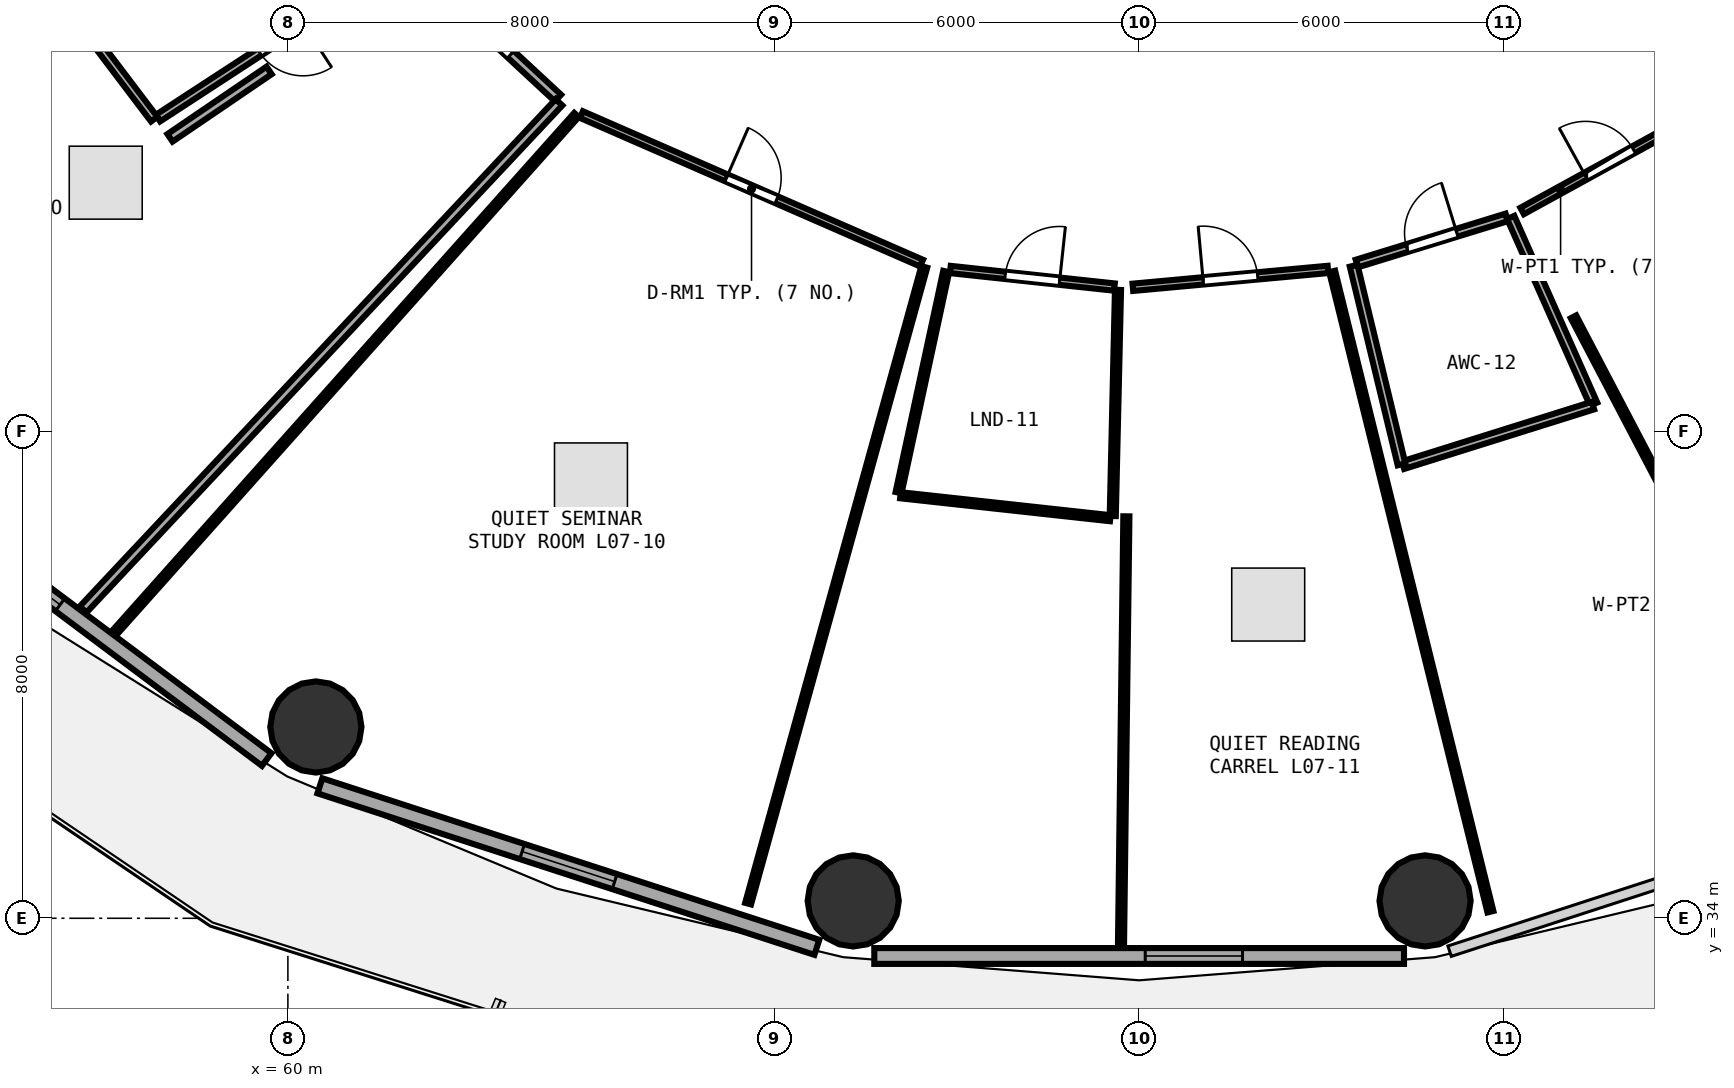
"""IFC4 building model, lengths in metres.
Left out: names, types, materials, properties, quantities, classifications, styles, units other than length and angle.
Written with IfcOpenShell. Run it as: python <this file> out.ifc"""

import sys

from ifc_helpers import new_model, si_unit, direction, frame, frame_2d, origin, origin_2d, place, context, subcontext, project, spatial, rectangle, circle, extrude, element, fill, save


model = new_model("IFC4")
c1 = context("Model", 3, precision=1e-05, world=origin(), true_north=direction((0.0, 1.0)))
c2 = subcontext(c1, "Body", "Model", "MODEL_VIEW")
j1 = project(units=[si_unit("LENGTHUNIT", "METRE"), si_unit("PLANEANGLEUNIT", "RADIAN")], contexts=[c1])
p1 = place(None, origin())
s1 = spatial("IfcSite", under=j1, at=p1, CompositionType="ELEMENT")
p2 = place(p1, origin())
s2 = spatial("IfcBuilding", under=s1, at=p2, CompositionType="ELEMENT")
p3 = place(p2, frame((0.0, 0.0, 30.0)))
s3 = spatial("IfcBuildingStorey", under=s2, at=p3, CompositionType="ELEMENT", Elevation=30.0)
for number, where, z_axis, x_axis in (
    (1, (60.46, 37.146, 0.0), (0.0, 0.0, 1.0), (1.0, 0.0, 0.0)),
    (2, (69.298, 34.286, 0.0), (0.0, 0.0, 1.0), (1.0, 0.0, 0.0)),
    (3, (78.702, 34.286, 0.0), (0.0, 0.0, 1.0), (1.0, 0.0, 0.0)),
):
    element("IfcColumn", number, at=place(p3, frame(where, z_axis=z_axis, x_axis=x_axis)), inside=s3, PredefinedType="COLUMN", context=c2, shape_type="SweptSolid", body=[
        extrude(circle(Radius=0.75, at=origin_2d()), origin(), (0.0, 0.0, 1.0), 3.75),
    ])
p4 = place(p3, frame((53.016, 41.582, 0.0), z_axis=(0.0, 0.0, 1.0), x_axis=(0.80030733173, -0.599590005569, 0.0)))
e4 = element("IfcWall", 4, at=p4, inside=s3, PredefinedType="SOLIDWALL", context=c2, shape_type="SweptSolid", body=[
    extrude(rectangle(XDim=8.291, YDim=0.26, at=frame_2d((4.145, 0.0))), origin(), (0.0, 0.0, 1.0), 3.475),
])
p5 = place(p4, frame((2.445, 0.0, 0.85)))
e5 = element("IfcOpeningElement", 5, at=p5, cuts=e4, PredefinedType="OPENING", context=c2, shape_type="SweptSolid", body=[
    extrude(rectangle(XDim=1.6, YDim=1.45, at=frame_2d((0.8, 0.725))), frame((0.0, 0.14, 0.0), z_axis=(0.0, -1.0, 0.0), x_axis=(1.0, 0.0, 0.0)), (0.0, 0.0, 1.0), 0.28),
])
p6 = place(p3, frame((60.526, 36.178, 0.0), z_axis=(0.0, 0.0, 1.0), x_axis=(0.951039914291, -0.309068085421, 0.0)))
e6 = element("IfcWall", 6, at=p6, inside=s3, PredefinedType="SOLIDWALL", context=c2, shape_type="SweptSolid", body=[
    extrude(rectangle(XDim=8.594, YDim=0.26, at=frame_2d((4.297, 0.0))), origin(), (0.0, 0.0, 1.0), 3.475),
])
p7 = place(p6, frame((3.497, 0.0, 0.85)))
e7 = element("IfcOpeningElement", 7, at=p7, cuts=e6, PredefinedType="OPENING", context=c2, shape_type="SweptSolid", body=[
    extrude(rectangle(XDim=1.6, YDim=1.45, at=frame_2d((0.8, 0.725))), frame((0.0, 0.14, 0.0), z_axis=(0.0, -1.0, 0.0), x_axis=(1.0, 0.0, 0.0)), (0.0, 0.0, 1.0), 0.28),
])
p8 = place(p3, frame((69.644, 33.38, 0.0), z_axis=(0.0, 0.0, 1.0), x_axis=(1.0, 0.0, 0.0)))
e8 = element("IfcWall", 8, at=p8, inside=s3, PredefinedType="SOLIDWALL", context=c2, shape_type="SweptSolid", body=[
    extrude(rectangle(XDim=8.712, YDim=0.26, at=frame_2d((4.356, 0.0))), origin(), (0.0, 0.0, 1.0), 3.475),
])
p9 = place(p8, frame((4.456, 0.0, 0.85)))
e9 = element("IfcOpeningElement", 9, at=p9, cuts=e8, PredefinedType="OPENING", context=c2, shape_type="SweptSolid", body=[
    extrude(rectangle(XDim=1.6, YDim=1.45, at=frame_2d((0.8, 0.725))), frame((0.0, 0.14, 0.0), z_axis=(0.0, -1.0, 0.0), x_axis=(1.0, 0.0, 0.0)), (0.0, 0.0, 1.0), 0.28),
])
p10 = place(p3, frame((61.917, 49.8, 0.0), z_axis=(0.0, 0.0, 1.0), x_axis=(-0.837796261941, -0.545982988267, 0.0)))
e10 = element("IfcWall", 10, at=p10, inside=s3, PredefinedType="PLUMBINGWALL", context=c2, shape_type="SweptSolid", body=[
    extrude(rectangle(XDim=4.838, YDim=0.13, at=frame_2d((2.419, 0.0))), origin(), (0.0, 0.0, 1.0), 3.235),
])
p11 = place(p10, frame((1.989, 0.0, 0.0)))
e11 = element("IfcOpeningElement", 11, at=p11, cuts=e10, PredefinedType="OPENING", context=c2, shape_type="SweptSolid", body=[
    extrude(rectangle(XDim=0.86, YDim=2.05, at=frame_2d((0.43, 1.025))), frame((0.0, 0.075, 0.0), z_axis=(0.0, -1.0, 0.0), x_axis=(1.0, 0.0, 0.0)), (0.0, 0.0, 1.0), 0.15),
])
p12 = place(p3, frame((62.194, 49.575, 0.0), z_axis=(0.0, 0.0, 1.0), x_axis=(0.7329267348, -0.680307578538, 0.0)))
e12 = element("IfcWall", 12, at=p12, inside=s3, PredefinedType="PARTITIONING", context=c2, shape_type="SweptSolid", body=[
    extrude(rectangle(XDim=3.067, YDim=0.15, at=frame_2d((1.533, 0.0))), origin(), (0.0, 0.0, 1.0), 2.875),
])
p13 = place(p12, frame((1.059, 0.0, 0.0)))
e13 = element("IfcOpeningElement", 13, at=p13, cuts=e12, PredefinedType="OPENING", context=c2, shape_type="SweptSolid", body=[
    extrude(rectangle(XDim=0.95, YDim=2.08, at=frame_2d((0.475, 1.04))), frame((0.0, 0.085, 0.0), z_axis=(0.0, -1.0, 0.0), x_axis=(1.0, 0.0, 0.0)), (0.0, 0.0, 1.0), 0.17),
])
p14 = place(p3, frame((64.828, 47.217, 0.0), z_axis=(0.0, 0.0, 1.0), x_axis=(0.916419655578, -0.400218708797, 0.0)))
e14 = element("IfcWall", 14, at=p14, inside=s3, PredefinedType="PARTITIONING", context=c2, shape_type="SweptSolid", body=[
    extrude(rectangle(XDim=6.104, YDim=0.12, at=frame_2d((3.052, 0.0))), origin(), (0.0, 0.0, 1.0), 2.875),
])
p15 = place(p14, frame((2.602, 0.0, 0.0)))
e15 = element("IfcOpeningElement", 15, at=p15, cuts=e14, PredefinedType="OPENING", context=c2, shape_type="SweptSolid", body=[
    extrude(rectangle(XDim=0.9, YDim=2.08, at=frame_2d((0.45, 1.04))), frame((0.0, 0.07, 0.0), z_axis=(0.0, -1.0, 0.0), x_axis=(1.0, 0.0, 0.0)), (0.0, 0.0, 1.0), 0.14),
])
p16 = place(p3, frame((70.895, 44.67, 0.0), z_axis=(0.0, 0.0, 1.0), x_axis=(0.994302004983, -0.106599825921, 0.0)))
e16 = element("IfcWall", 16, at=p16, inside=s3, PredefinedType="PARTITIONING", context=c2, shape_type="SweptSolid", body=[
    extrude(rectangle(XDim=2.714, YDim=0.12, at=frame_2d((1.357, 0.0))), origin(), (0.0, 0.0, 1.0), 3.235),
])
p17 = place(p16, frame((0.907, 0.0, 0.0)))
e17 = element("IfcOpeningElement", 17, at=p17, cuts=e16, PredefinedType="OPENING", context=c2, shape_type="SweptSolid", body=[
    extrude(rectangle(XDim=0.9, YDim=2.08, at=frame_2d((0.45, 1.04))), frame((0.0, 0.07, 0.0), z_axis=(0.0, -1.0, 0.0), x_axis=(1.0, 0.0, 0.0)), (0.0, 0.0, 1.0), 0.14),
])
p18 = place(p3, frame((73.897, 44.376, 0.0), z_axis=(0.0, 0.0, 1.0), x_axis=(0.995829610124, 0.091232601628, 0.0)))
e18 = element("IfcWall", 18, at=p18, inside=s3, PredefinedType="PARTITIONING", context=c2, shape_type="SweptSolid", body=[
    extrude(rectangle(XDim=3.222, YDim=0.12, at=frame_2d((1.611, 0.0))), origin(), (0.0, 0.0, 1.0), 3.235),
])
p19 = place(p18, frame((1.161, 0.0, 0.0)))
e19 = element("IfcOpeningElement", 19, at=p19, cuts=e18, PredefinedType="OPENING", context=c2, shape_type="SweptSolid", body=[
    extrude(rectangle(XDim=0.9, YDim=2.08, at=frame_2d((0.45, 1.04))), frame((0.0, 0.07, 0.0), z_axis=(0.0, -1.0, 0.0), x_axis=(1.0, 0.0, 0.0)), (0.0, 0.0, 1.0), 0.14),
])
p20 = place(p3, frame((77.58, 44.768, 0.0), z_axis=(0.0, 0.0, 1.0), x_axis=(0.955754448098, 0.294165659011, 0.0)))
e20 = element("IfcWall", 20, at=p20, inside=s3, PredefinedType="PLUMBINGWALL", context=c2, shape_type="SweptSolid", body=[
    extrude(rectangle(XDim=2.579, YDim=0.13, at=frame_2d((1.29, 0.0))), origin(), (0.0, 0.0, 1.0), 3.235),
])
p21 = place(p20, frame((0.86, 0.0, 0.0)))
e21 = element("IfcOpeningElement", 21, at=p21, cuts=e20, PredefinedType="OPENING", context=c2, shape_type="SweptSolid", body=[
    extrude(rectangle(XDim=0.86, YDim=2.05, at=frame_2d((0.43, 1.025))), frame((0.0, 0.075, 0.0), z_axis=(0.0, -1.0, 0.0), x_axis=(1.0, 0.0, 0.0)), (0.0, 0.0, 1.0), 0.15),
])
p22 = place(p3, frame((80.299, 45.632, 0.0), z_axis=(0.0, 0.0, 1.0), x_axis=(0.876387079092, 0.481607399861, 0.0)))
e22 = element("IfcWall", 22, at=p22, inside=s3, PredefinedType="PARTITIONING", context=c2, shape_type="SweptSolid", body=[
    extrude(rectangle(XDim=3.281, YDim=0.12, at=frame_2d((1.641, 0.0))), origin(), (0.0, 0.0, 1.0), 2.875),
])
p23 = place(p22, frame((1.191, 0.0, 0.0)))
e23 = element("IfcOpeningElement", 23, at=p23, cuts=e22, PredefinedType="OPENING", context=c2, shape_type="SweptSolid", body=[
    extrude(rectangle(XDim=0.9, YDim=2.08, at=frame_2d((0.45, 1.04))), frame((0.0, 0.07, 0.0), z_axis=(0.0, -1.0, 0.0), x_axis=(1.0, 0.0, 0.0)), (0.0, 0.0, 1.0), 0.14),
])
p24 = place(p3, frame((60.343, 52.222, 0.0), z_axis=(0.0, 0.0, 1.0), x_axis=(-0.926333713065, -0.376703931542, 0.0)))
e24 = element("IfcWall", 24, at=p24, inside=s3, PredefinedType="PARTITIONING", context=c2, shape_type="SweptSolid", body=[
    extrude(rectangle(XDim=12.099, YDim=0.1, at=frame_2d((6.05, 0.0))), origin(), (0.0, 0.0, 1.0), 2.875),
])
p25 = place(p3, frame((57.801, 47.142, 0.0), z_axis=(0.0, 0.0, 1.0), x_axis=(-0.60376191721, 0.797164692725, 0.0)))
e25 = element("IfcWall", 25, at=p25, inside=s3, PredefinedType="PLUMBINGWALL", context=c2, shape_type="SweptSolid", body=[
    extrude(rectangle(XDim=1.669, YDim=0.13, at=frame_2d((0.834, 0.0))), origin(), (0.0, 0.0, 1.0), 3.175),
])
p26 = place(p3, frame((64.458, 47.419, 0.0), z_axis=(0.0, 0.0, 1.0), x_axis=(-0.684261294523, -0.729236916796, 0.0)))
e26 = element("IfcWall", 26, at=p26, inside=s3, PredefinedType="PARTITIONING", context=c2, shape_type="SweptSolid", body=[
    extrude(rectangle(XDim=11.438, YDim=0.15, at=frame_2d((5.719, 0.0))), origin(), (0.0, 0.0, 1.0), 2.875),
])
p27 = place(p3, frame((58.061, 46.834, 0.0), z_axis=(0.0, 0.0, 1.0), x_axis=(0.826811291248, 0.562479411769, 0.0)))
e27 = element("IfcWall", 27, at=p27, inside=s3, PredefinedType="PARTITIONING", context=c2, shape_type="SweptSolid", body=[
    extrude(rectangle(XDim=1.971, YDim=0.15, at=frame_2d((0.985, 0.0))), origin(), (0.0, 0.0, 1.0), 3.48),
])
p28 = place(p3, frame((70.466, 44.711, 0.0), z_axis=(0.0, 0.0, 1.0), x_axis=(-0.26671307518, -0.963775977875, 0.0)))
e28 = element("IfcWall", 28, at=p28, inside=s3, PredefinedType="PARTITIONING", context=c2, shape_type="SweptSolid", body=[
    extrude(rectangle(XDim=10.865, YDim=0.1, at=frame_2d((5.432, 0.0))), origin(), (0.0, 0.0, 1.0), 2.875),
])
p29 = place(p3, frame((57.156, 38.706, 0.0), z_axis=(0.0, 0.0, 1.0), x_axis=(0.66580890104, 0.746122313897, 0.0)))
e29 = element("IfcWall", 29, at=p29, inside=s3, PredefinedType="PARTITIONING", context=c2, shape_type="SweptSolid", body=[
    extrude(rectangle(XDim=11.399, YDim=0.1, at=frame_2d((5.7, 0.0))), origin(), (0.0, 0.0, 1.0), 2.875),
])
p30 = place(p3, frame((73.652, 44.334, 0.0), z_axis=(0.0, 0.0, 1.0), x_axis=(-0.02316715399, -0.99973160547, 0.0)))
e30 = element("IfcWall", 30, at=p30, inside=s3, PredefinedType="PARTITIONING", context=c2, shape_type="SweptSolid", body=[
    extrude(rectangle(XDim=3.72, YDim=0.1, at=frame_2d((1.86, 0.0))), origin(), (0.0, 0.0, 1.0), 3.175),
])
p31 = place(p3, frame((73.525, 40.579, 0.0), z_axis=(0.0, 0.0, 1.0), x_axis=(-0.994070147468, 0.108740709544, 0.0)))
e31 = element("IfcWall", 31, at=p31, inside=s3, PredefinedType="PARTITIONING", context=c2, shape_type="SweptSolid", body=[
    extrude(rectangle(XDim=3.471, YDim=0.1, at=frame_2d((1.735, 0.0))), origin(), (0.0, 0.0, 1.0), 3.175),
])
p32 = place(p3, frame((70.043, 41.0, 0.0), z_axis=(0.0, 0.0, 1.0), x_axis=(0.210519412271, 0.977589677246, 0.0)))
e32 = element("IfcWall", 32, at=p32, inside=s3, PredefinedType="PARTITIONING", context=c2, shape_type="SweptSolid", body=[
    extrude(rectangle(XDim=3.72, YDim=0.1, at=frame_2d((1.86, 0.0))), origin(), (0.0, 0.0, 1.0), 3.175),
])
p33 = place(p3, frame((77.175, 44.637, 0.0), z_axis=(0.0, 0.0, 1.0), x_axis=(0.239971369295, -0.970779965759, 0.0)))
e33 = element("IfcWall", 33, at=p33, inside=s3, PredefinedType="PARTITIONING", context=c2, shape_type="SweptSolid", body=[
    extrude(rectangle(XDim=10.846, YDim=0.1, at=frame_2d((5.423, 0.0))), origin(), (0.0, 0.0, 1.0), 2.875),
])
p34 = place(p3, frame((73.701, 33.561, 0.0), z_axis=(0.0, 0.0, 1.0), x_axis=(0.012537113793, 0.9999214073, 0.0)))
e34 = element("IfcWall", 34, at=p34, inside=s3, PredefinedType="PARTITIONING", context=c2, shape_type="SweptSolid", body=[
    extrude(rectangle(XDim=7.049, YDim=0.1, at=frame_2d((3.525, 0.0))), origin(), (0.0, 0.0, 1.0), 2.875),
])
p35 = place(p3, frame((80.111, 45.526, 0.0), z_axis=(0.0, 0.0, 1.0), x_axis=(0.405936178007, -0.913901427608, 0.0)))
e35 = element("IfcWall", 35, at=p35, inside=s3, PredefinedType="PLUMBINGWALL", context=c2, shape_type="SweptSolid", body=[
    extrude(rectangle(XDim=3.36, YDim=0.13, at=frame_2d((1.68, 0.0))), origin(), (0.0, 0.0, 1.0), 2.875),
])
p36 = place(p3, frame((81.464, 42.431, 0.0), z_axis=(0.0, 0.0, 1.0), x_axis=(-0.954175708416, -0.299246917226, 0.0)))
e36 = element("IfcWall", 36, at=p36, inside=s3, PredefinedType="PLUMBINGWALL", context=c2, shape_type="SweptSolid", body=[
    extrude(rectangle(XDim=3.275, YDim=0.13, at=frame_2d((1.637, 0.0))), origin(), (0.0, 0.0, 1.0), 2.875),
])
p37 = place(p3, frame((78.315, 41.464, 0.0), z_axis=(0.0, 0.0, 1.0), x_axis=(-0.234406131581, 0.972138758345, 0.0)))
e37 = element("IfcWall", 37, at=p37, inside=s3, PredefinedType="PLUMBINGWALL", context=c2, shape_type="SweptSolid", body=[
    extrude(rectangle(XDim=3.36, YDim=0.13, at=frame_2d((1.68, 0.0))), origin(), (0.0, 0.0, 1.0), 3.235),
])
p38 = place(p3, frame((85.401, 35.769, 0.0), z_axis=(0.0, 0.0, 1.0), x_axis=(-0.464308397246, 0.885673592384, 0.0)))
e38 = element("IfcWall", 38, at=p38, inside=s3, PredefinedType="PARTITIONING", context=c2, shape_type="SweptSolid", body=[
    extrude(rectangle(XDim=9.17, YDim=0.1, at=frame_2d((4.585, 0.0))), origin(), (0.0, 0.0, 1.0), 2.875),
])
p39 = place(p5, origin())
e39 = element("IfcWindow", 39, at=p39, inside=s3, PartitioningType="SINGLE_PANEL", PredefinedType="WINDOW", context=c2, shape_type="SweptSolid", body=[
    extrude(rectangle(XDim=1.6, YDim=1.45, at=frame_2d((0.8, 0.725))), frame((0.0, 0.03, 0.0), z_axis=(0.0, -1.0, 0.0), x_axis=(1.0, 0.0, 0.0)), (0.0, 0.0, 1.0), 0.06),
])
fill(e5, e39)
p40 = place(p7, origin())
e40 = element("IfcWindow", 40, at=p40, inside=s3, PartitioningType="SINGLE_PANEL", PredefinedType="WINDOW", context=c2, shape_type="SweptSolid", body=[
    extrude(rectangle(XDim=1.6, YDim=1.45, at=frame_2d((0.8, 0.725))), frame((0.0, 0.03, 0.0), z_axis=(0.0, -1.0, 0.0), x_axis=(1.0, 0.0, 0.0)), (0.0, 0.0, 1.0), 0.06),
])
fill(e7, e40)
p41 = place(p9, origin())
e41 = element("IfcWindow", 41, at=p41, inside=s3, PartitioningType="SINGLE_PANEL", PredefinedType="WINDOW", context=c2, shape_type="SweptSolid", body=[
    extrude(rectangle(XDim=1.6, YDim=1.45, at=frame_2d((0.8, 0.725))), frame((0.0, 0.03, 0.0), z_axis=(0.0, -1.0, 0.0), x_axis=(1.0, 0.0, 0.0)), (0.0, 0.0, 1.0), 0.06),
])
fill(e9, e41)
p42 = place(p11, origin())
e42 = element("IfcDoor", 42, at=p42, inside=s3, OperationType="SINGLE_SWING_LEFT", PredefinedType="DOOR", context=c2, shape_type="SweptSolid", body=[
    extrude(rectangle(XDim=0.86, YDim=2.05, at=frame_2d((0.43, 1.025))), frame((0.0, 0.025, 0.0), z_axis=(0.0, -1.0, 0.0), x_axis=(1.0, 0.0, 0.0)), (0.0, 0.0, 1.0), 0.05),
])
fill(e11, e42)
p43 = place(p13, origin())
e43 = element("IfcDoor", 43, at=p43, inside=s3, OperationType="SINGLE_SWING_RIGHT", PredefinedType="DOOR", context=c2, shape_type="SweptSolid", body=[
    extrude(rectangle(XDim=0.95, YDim=2.08, at=frame_2d((0.475, 1.04))), frame((0.0, 0.025, 0.0), z_axis=(0.0, -1.0, 0.0), x_axis=(1.0, 0.0, 0.0)), (0.0, 0.0, 1.0), 0.05),
])
fill(e13, e43)
p44 = place(p15, origin())
e44 = element("IfcDoor", 44, at=p44, inside=s3, OperationType="SINGLE_SWING_LEFT", PredefinedType="DOOR", context=c2, shape_type="SweptSolid", body=[
    extrude(rectangle(XDim=0.9, YDim=2.08, at=frame_2d((0.45, 1.04))), frame((0.0, 0.025, 0.0), z_axis=(0.0, -1.0, 0.0), x_axis=(1.0, 0.0, 0.0)), (0.0, 0.0, 1.0), 0.05),
])
fill(e15, e44)
p45 = place(p17, origin())
e45 = element("IfcDoor", 45, at=p45, inside=s3, OperationType="SINGLE_SWING_RIGHT", PredefinedType="DOOR", context=c2, shape_type="SweptSolid", body=[
    extrude(rectangle(XDim=0.9, YDim=2.08, at=frame_2d((0.45, 1.04))), frame((0.0, 0.025, 0.0), z_axis=(0.0, -1.0, 0.0), x_axis=(1.0, 0.0, 0.0)), (0.0, 0.0, 1.0), 0.05),
])
fill(e17, e45)
p46 = place(p19, origin())
e46 = element("IfcDoor", 46, at=p46, inside=s3, OperationType="SINGLE_SWING_LEFT", PredefinedType="DOOR", context=c2, shape_type="SweptSolid", body=[
    extrude(rectangle(XDim=0.9, YDim=2.08, at=frame_2d((0.45, 1.04))), frame((0.0, 0.025, 0.0), z_axis=(0.0, -1.0, 0.0), x_axis=(1.0, 0.0, 0.0)), (0.0, 0.0, 1.0), 0.05),
])
fill(e19, e46)
p47 = place(p21, origin())
e47 = element("IfcDoor", 47, at=p47, inside=s3, OperationType="SINGLE_SWING_RIGHT", PredefinedType="DOOR", context=c2, shape_type="SweptSolid", body=[
    extrude(rectangle(XDim=0.86, YDim=2.05, at=frame_2d((0.43, 1.025))), frame((0.0, 0.025, 0.0), z_axis=(0.0, -1.0, 0.0), x_axis=(1.0, 0.0, 0.0)), (0.0, 0.0, 1.0), 0.05),
])
fill(e21, e47)
p48 = place(p23, origin())
e48 = element("IfcDoor", 48, at=p48, inside=s3, OperationType="SINGLE_SWING_LEFT", PredefinedType="DOOR", context=c2, shape_type="SweptSolid", body=[
    extrude(rectangle(XDim=0.9, YDim=2.08, at=frame_2d((0.45, 1.04))), frame((0.0, 0.025, 0.0), z_axis=(0.0, -1.0, 0.0), x_axis=(1.0, 0.0, 0.0)), (0.0, 0.0, 1.0), 0.05),
])
fill(e23, e48)
save(model, sys.argv[1])
